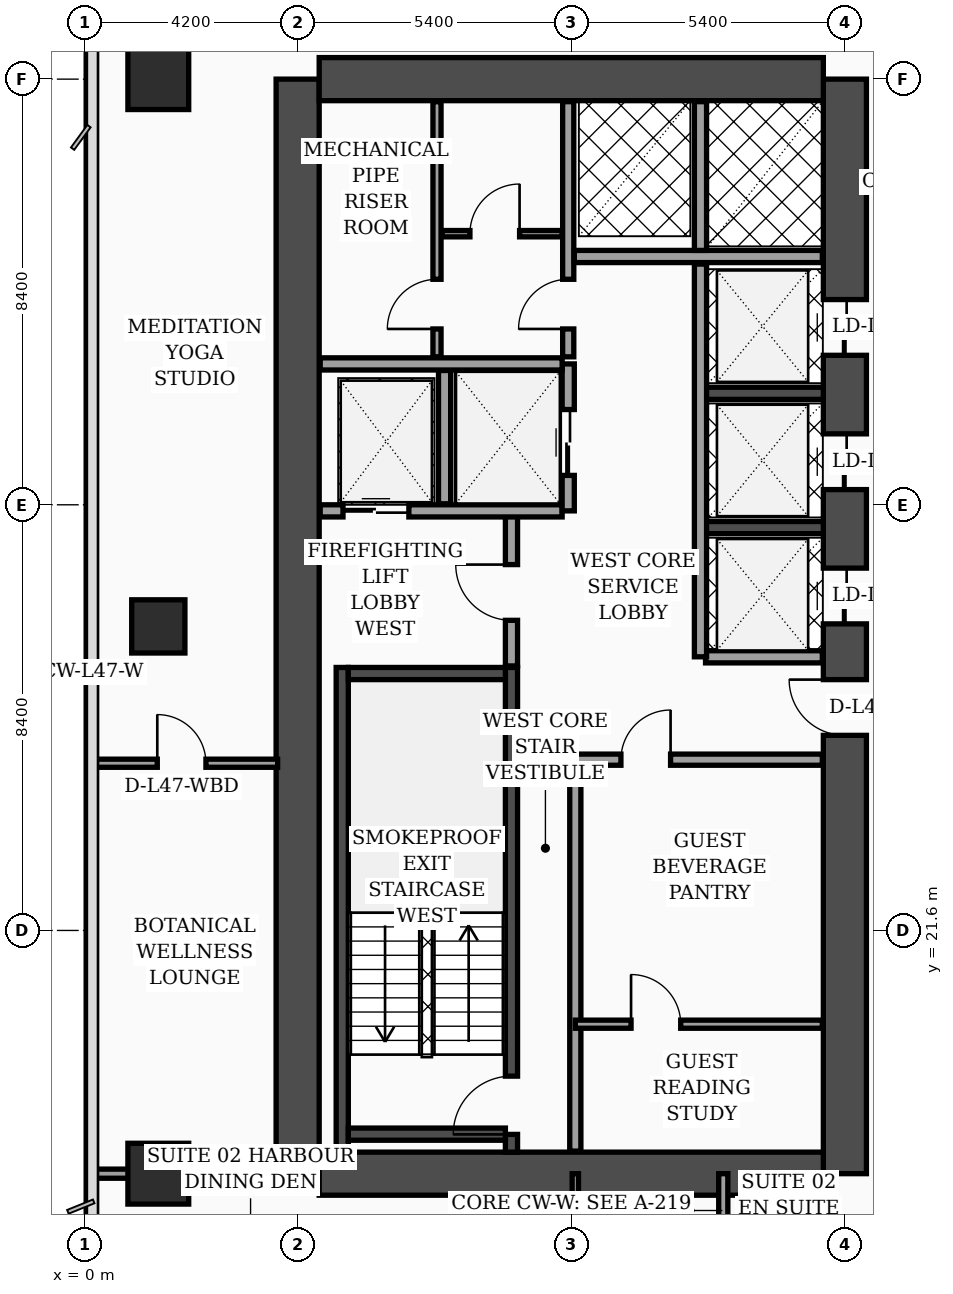
"""IFC4 building model, lengths in metres.
Left out: names, types, materials, properties, quantities, classifications, styles, units other than length and angle.
Written with IfcOpenShell. Run it as: python <this file> out.ifc"""

import sys

from ifc_helpers import new_model, si_unit, direction, frame, frame_2d, origin, origin_2d, place, context, subcontext, project, spatial, rectangle, extrude, element, fill, save


model = new_model("IFC4")
c1 = context("Model", 3, precision=1e-05, world=origin(), true_north=direction((0.0, 1.0)))
c2 = subcontext(c1, "Body", "Model", "MODEL_VIEW")
j1 = project(units=[si_unit("LENGTHUNIT", "METRE"), si_unit("PLANEANGLEUNIT", "RADIAN")], contexts=[c1])
p1 = place(None, origin())
s1 = spatial("IfcSite", under=j1, at=p1, CompositionType="ELEMENT")
p2 = place(p1, origin())
s2 = spatial("IfcBuilding", under=s1, at=p2, CompositionType="ELEMENT")
p3 = place(p2, frame((0.0, 0.0, 191.3)))
s3 = spatial("IfcBuildingStorey", under=s2, at=p3, CompositionType="ELEMENT", Elevation=191.3)
p4 = place(p3, frame((4.2, 16.8, 0.0), z_axis=(0.0, 0.0, 1.0), x_axis=(0.0, 1.0, 0.0)))
e1 = element("IfcWall", 1, at=p4, inside=s3, PredefinedType="SHEAR", context=c2, shape_type="SweptSolid", body=[
    extrude(rectangle(XDim=21.6, YDim=0.85, at=frame_2d((10.8, 0.0))), origin(), (0.0, 0.0, 1.0), 3.56),
])
p5 = place(p3, frame((15.0, 16.8, 0.0), z_axis=(0.0, 0.0, 1.0), x_axis=(0.0, 1.0, 0.0)))
e2 = element("IfcWall", 2, at=p5, inside=s3, PredefinedType="SHEAR", context=c2, shape_type="SweptSolid", body=[
    extrude(rectangle(XDim=21.6, YDim=0.85, at=frame_2d((10.8, 0.0))), origin(), (0.0, 0.0, 1.0), 3.56),
])
p6 = place(p5, frame((8.65, 0.0, 0.0)))
e3 = element("IfcOpeningElement", 3, at=p6, cuts=e2, PredefinedType="OPENING", context=c2, shape_type="SweptSolid", body=[
    extrude(rectangle(XDim=1.1, YDim=2.2, at=frame_2d((0.55, 1.1))), frame((0.0, 0.435, 0.0), z_axis=(0.0, -1.0, 0.0), x_axis=(1.0, 0.0, 0.0)), (0.0, 0.0, 1.0), 0.87),
])
p7 = place(p5, frame((10.85, 0.0, 0.0)))
e4 = element("IfcOpeningElement", 4, at=p7, cuts=e2, PredefinedType="OPENING", context=c2, shape_type="SweptSolid", body=[
    extrude(rectangle(XDim=1.1, YDim=2.2, at=frame_2d((0.55, 1.1))), frame((0.0, 0.435, 0.0), z_axis=(0.0, -1.0, 0.0), x_axis=(1.0, 0.0, 0.0)), (0.0, 0.0, 1.0), 0.87),
])
p8 = place(p5, frame((13.5, 0.0, 0.0)))
e5 = element("IfcOpeningElement", 5, at=p8, cuts=e2, PredefinedType="OPENING", context=c2, shape_type="SweptSolid", body=[
    extrude(rectangle(XDim=1.1, YDim=2.2, at=frame_2d((0.55, 1.1))), frame((0.0, 0.435, 0.0), z_axis=(0.0, -1.0, 0.0), x_axis=(1.0, 0.0, 0.0)), (0.0, 0.0, 1.0), 0.87),
])
p9 = place(p5, frame((16.15, 0.0, 0.0)))
e6 = element("IfcOpeningElement", 6, at=p9, cuts=e2, PredefinedType="OPENING", context=c2, shape_type="SweptSolid", body=[
    extrude(rectangle(XDim=1.1, YDim=2.2, at=frame_2d((0.55, 1.1))), frame((0.0, 0.435, 0.0), z_axis=(0.0, -1.0, 0.0), x_axis=(1.0, 0.0, 0.0)), (0.0, 0.0, 1.0), 0.87),
])
for number, where, z_axis, x_axis in (
    (7, (4.625, 38.4, 0.0), (0.0, 0.0, 1.0), (1.0, 0.0, 0.0)),
    (8, (4.625, 16.8, 0.0), (0.0, 0.0, 1.0), (1.0, 0.0, 0.0)),
):
    element("IfcWall", number, at=place(p3, frame(where, z_axis=z_axis, x_axis=x_axis)), inside=s3, PredefinedType="SHEAR", context=c2, shape_type="SweptSolid", body=[
        extrude(rectangle(XDim=9.95, YDim=0.85, at=frame_2d((4.975, 0.0))), origin(), (0.0, 0.0, 1.0), 3.56),
    ])
p10 = place(p3, frame((5.08, 17.225, 0.0), z_axis=(0.0, 0.0, 1.0), x_axis=(0.0, 1.0, 0.0)))
e9 = element("IfcWall", 9, at=p10, inside=s3, PredefinedType="SOLIDWALL", context=c2, shape_type="SweptSolid", body=[
    extrude(rectangle(XDim=9.565, YDim=0.24, at=frame_2d((4.782, 0.0))), origin(), (0.0, 0.0, 1.0), 3.56),
])
p11 = place(p3, frame((8.42, 17.225, 0.0), z_axis=(0.0, 0.0, 1.0), x_axis=(0.0, 1.0, 0.0)))
e10 = element("IfcWall", 10, at=p11, inside=s3, PredefinedType="SOLIDWALL", context=c2, shape_type="SweptSolid", body=[
    extrude(rectangle(XDim=9.565, YDim=0.24, at=frame_2d((4.782, 0.0))), origin(), (0.0, 0.0, 1.0), 3.56),
])
p12 = place(p11, frame((0.35, 0.0, 0.0)))
e11 = element("IfcOpeningElement", 11, at=p12, cuts=e10, PredefinedType="OPENING", context=c2, shape_type="SweptSolid", body=[
    extrude(rectangle(XDim=1.15, YDim=2.2, at=frame_2d((0.575, 1.1))), frame((0.0, 0.13, 0.0), z_axis=(0.0, -1.0, 0.0), x_axis=(1.0, 0.0, 0.0)), (0.0, 0.0, 1.0), 0.26),
])
for number, where, z_axis, x_axis in (
    (12, (5.2, 17.58, 0.0), (0.0, 0.0, 1.0), (1.0, 0.0, 0.0)),
    (13, (5.2, 26.67, 0.0), (0.0, 0.0, 1.0), (1.0, 0.0, 0.0)),
):
    element("IfcWall", number, at=place(p3, frame(where, z_axis=z_axis, x_axis=x_axis)), inside=s3, PredefinedType="SOLIDWALL", context=c2, shape_type="SweptSolid", body=[
        extrude(rectangle(XDim=3.1, YDim=0.24, at=frame_2d((1.55, 0.0))), origin(), (0.0, 0.0, 1.0), 3.56),
    ])
for number, where, z_axis, x_axis in (
    (14, (12.18, 29.55, 0.0), (0.0, 0.0, 1.0), (1.0, 0.0, 0.0)),
    (15, (12.18, 32.2, 0.0), (0.0, 0.0, 1.0), (1.0, 0.0, 0.0)),
):
    element("IfcWall", number, at=place(p3, frame(where, z_axis=z_axis, x_axis=x_axis)), inside=s3, PredefinedType="SOLIDWALL", context=c2, shape_type="SweptSolid", body=[
        extrude(rectangle(XDim=2.395, YDim=0.24, at=frame_2d((1.198, 0.0))), origin(), (0.0, 0.0, 1.0), 3.56),
    ])
p13 = place(p3, frame((1.45, 16.8, 0.0), z_axis=(0.0, 0.0, 1.0), x_axis=(1.0, 0.0, 0.0)))
e16 = element("IfcColumn", 16, at=p13, inside=s3, PredefinedType="COLUMN", context=c2, shape_type="SweptSolid", body=[
    extrude(rectangle(XDim=1.2, YDim=1.2, at=origin_2d()), origin(), (0.0, 0.0, 1.0), 3.56),
])
p14 = place(p3, frame((1.45, 27.6, 0.0), z_axis=(0.0, 0.0, 1.0), x_axis=(1.0, 0.0, 0.0)))
e17 = element("IfcColumn", 17, at=p14, inside=s3, PredefinedType="COLUMN", context=c2, shape_type="SweptSolid", body=[
    extrude(rectangle(XDim=1.05, YDim=1.05, at=origin_2d()), origin(), (0.0, 0.0, 1.0), 3.56),
])
p15 = place(p3, frame((1.45, 38.4, 0.0), z_axis=(0.0, 0.0, 1.0), x_axis=(1.0, 0.0, 0.0)))
e18 = element("IfcColumn", 18, at=p15, inside=s3, PredefinedType="COLUMN", context=c2, shape_type="SweptSolid", body=[
    extrude(rectangle(XDim=1.2, YDim=1.2, at=origin_2d()), origin(), (0.0, 0.0, 1.0), 3.56),
])
p16 = place(p3, frame((8.42, 26.82, 0.0), z_axis=(0.0, 0.0, 1.0), x_axis=(0.0, 1.0, 0.0)))
e19 = element("IfcWall", 19, at=p16, inside=s3, PredefinedType="SOLIDWALL", context=c2, shape_type="SweptSolid", body=[
    extrude(rectangle(XDim=3.0, YDim=0.24, at=frame_2d((1.5, 0.0))), origin(), (0.0, 0.0, 1.0), 3.56),
])
p17 = place(p16, frame((0.9, 0.0, 0.0)))
e20 = element("IfcOpeningElement", 20, at=p17, cuts=e19, PredefinedType="OPENING", context=c2, shape_type="SweptSolid", body=[
    extrude(rectangle(XDim=1.1, YDim=2.2, at=frame_2d((0.55, 1.1))), frame((0.0, 0.13, 0.0), z_axis=(0.0, -1.0, 0.0), x_axis=(1.0, 0.0, 0.0)), (0.0, 0.0, 1.0), 0.26),
])
p18 = place(p3, frame((4.645, 29.88, 0.0), z_axis=(0.0, 0.0, 1.0), x_axis=(1.0, 0.0, 0.0)))
e21 = element("IfcWall", 21, at=p18, inside=s3, PredefinedType="SOLIDWALL", context=c2, shape_type="SweptSolid", body=[
    extrude(rectangle(XDim=4.775, YDim=0.24, at=frame_2d((2.387, 0.0))), origin(), (0.0, 0.0, 1.0), 3.56),
])
p19 = place(p18, frame((0.45, 0.0, 0.0)))
e22 = element("IfcOpeningElement", 22, at=p19, cuts=e21, PredefinedType="OPENING", context=c2, shape_type="SweptSolid", body=[
    extrude(rectangle(XDim=1.3, YDim=2.35, at=frame_2d((0.65, 1.175))), frame((0.0, 0.13, 0.0), z_axis=(0.0, -1.0, 0.0), x_axis=(1.0, 0.0, 0.0)), (0.0, 0.0, 1.0), 0.26),
])
p20 = place(p3, frame((7.1, 30.02, 0.0), z_axis=(0.0, 0.0, 1.0), x_axis=(0.0, 1.0, 0.0)))
e23 = element("IfcWall", 23, at=p20, inside=s3, PredefinedType="SOLIDWALL", context=c2, shape_type="SweptSolid", body=[
    extrude(rectangle(XDim=2.63, YDim=0.24, at=frame_2d((1.315, 0.0))), origin(), (0.0, 0.0, 1.0), 3.56),
])
p21 = place(p3, frame((9.54, 29.88, 0.0), z_axis=(0.0, 0.0, 1.0), x_axis=(0.0, 1.0, 0.0)))
e24 = element("IfcWall", 24, at=p21, inside=s3, PredefinedType="SOLIDWALL", context=c2, shape_type="SweptSolid", body=[
    extrude(rectangle(XDim=2.9, YDim=0.24, at=frame_2d((1.45, 0.0))), origin(), (0.0, 0.0, 1.0), 3.56),
])
p22 = place(p21, frame((0.7, 0.0, 0.0)))
e25 = element("IfcOpeningElement", 25, at=p22, cuts=e24, PredefinedType="OPENING", context=c2, shape_type="SweptSolid", body=[
    extrude(rectangle(XDim=1.3, YDim=2.35, at=frame_2d((0.65, 1.175))), frame((0.0, 0.13, 0.0), z_axis=(0.0, -1.0, 0.0), x_axis=(1.0, 0.0, 0.0)), (0.0, 0.0, 1.0), 0.26),
])
p23 = place(p3, frame((4.645, 32.78, 0.0), z_axis=(0.0, 0.0, 1.0), x_axis=(1.0, 0.0, 0.0)))
e26 = element("IfcWall", 26, at=p23, inside=s3, PredefinedType="SOLIDWALL", context=c2, shape_type="SweptSolid", body=[
    extrude(rectangle(XDim=4.775, YDim=0.24, at=frame_2d((2.387, 0.0))), origin(), (0.0, 0.0, 1.0), 3.19),
])
p24 = place(p3, frame((9.68, 17.245, 0.0), z_axis=(0.0, 0.0, 1.0), x_axis=(0.0, 1.0, 0.0)))
e27 = element("IfcWall", 27, at=p24, inside=s3, PredefinedType="SOLIDWALL", context=c2, shape_type="SweptSolid", body=[
    extrude(rectangle(XDim=7.755, YDim=0.22, at=frame_2d((3.877, 0.0))), origin(), (0.0, 0.0, 1.0), 3.56),
])
p25 = place(p3, frame((6.95, 32.92, 0.0), z_axis=(0.0, 0.0, 1.0), x_axis=(0.0, 1.0, 0.0)))
e28 = element("IfcWall", 28, at=p25, inside=s3, PredefinedType="PARTITIONING", context=c2, shape_type="SweptSolid", body=[
    extrude(rectangle(XDim=5.035, YDim=0.16, at=frame_2d((2.518, 0.0))), origin(), (0.0, 0.0, 1.0), 3.56),
])
p26 = place(p25, frame((0.55, 0.0, 0.0)))
e29 = element("IfcOpeningElement", 29, at=p26, cuts=e28, PredefinedType="OPENING", context=c2, shape_type="SweptSolid", body=[
    extrude(rectangle(XDim=0.98, YDim=2.15, at=frame_2d((0.49, 1.075))), frame((0.0, 0.09, 0.0), z_axis=(0.0, -1.0, 0.0), x_axis=(1.0, 0.0, 0.0)), (0.0, 0.0, 1.0), 0.18),
])
p27 = place(p3, frame((7.05, 35.35, 0.0), z_axis=(0.0, 0.0, 1.0), x_axis=(1.0, 0.0, 0.0)))
e30 = element("IfcWall", 30, at=p27, inside=s3, PredefinedType="PARTITIONING", context=c2, shape_type="SweptSolid", body=[
    extrude(rectangle(XDim=2.37, YDim=0.125, at=frame_2d((1.185, 0.0))), origin(), (0.0, 0.0, 1.0), 3.56),
])
p28 = place(p27, frame((0.55, 0.0, 0.0)))
e31 = element("IfcOpeningElement", 31, at=p28, cuts=e30, PredefinedType="OPENING", context=c2, shape_type="SweptSolid", body=[
    extrude(rectangle(XDim=0.98, YDim=2.15, at=frame_2d((0.49, 1.075))), frame((0.0, 0.073, 0.0), z_axis=(0.0, -1.0, 0.0), x_axis=(1.0, 0.0, 0.0)), (0.0, 0.0, 1.0), 0.145),
])
p29 = place(p3, frame((9.54, 32.92, 0.0), z_axis=(0.0, 0.0, 1.0), x_axis=(0.0, 1.0, 0.0)))
e32 = element("IfcWall", 32, at=p29, inside=s3, PredefinedType="SOLIDWALL", context=c2, shape_type="SweptSolid", body=[
    extrude(rectangle(XDim=5.035, YDim=0.22, at=frame_2d((2.518, 0.0))), origin(), (0.0, 0.0, 1.0), 3.56),
])
p30 = place(p29, frame((0.55, 0.0, 0.0)))
e33 = element("IfcOpeningElement", 33, at=p30, cuts=e32, PredefinedType="OPENING", context=c2, shape_type="SweptSolid", body=[
    extrude(rectangle(XDim=0.98, YDim=2.15, at=frame_2d((0.49, 1.075))), frame((0.0, 0.12, 0.0), z_axis=(0.0, -1.0, 0.0), x_axis=(1.0, 0.0, 0.0)), (0.0, 0.0, 1.0), 0.24),
])
p31 = place(p3, frame((9.68, 19.75, 0.0), z_axis=(0.0, 0.0, 1.0), x_axis=(1.0, 0.0, 0.0)))
e34 = element("IfcWall", 34, at=p31, inside=s3, PredefinedType="PARTITIONING", context=c2, shape_type="SweptSolid", body=[
    extrude(rectangle(XDim=4.875, YDim=0.16, at=frame_2d((2.438, 0.0))), origin(), (0.0, 0.0, 1.0), 3.56),
])
p32 = place(p31, frame((1.1, 0.0, 0.0)))
e35 = element("IfcOpeningElement", 35, at=p32, cuts=e34, PredefinedType="OPENING", context=c2, shape_type="SweptSolid", body=[
    extrude(rectangle(XDim=0.98, YDim=2.15, at=frame_2d((0.49, 1.075))), frame((0.0, 0.09, 0.0), z_axis=(0.0, -1.0, 0.0), x_axis=(1.0, 0.0, 0.0)), (0.0, 0.0, 1.0), 0.18),
])
p33 = place(p3, frame((9.68, 24.97, 0.0), z_axis=(0.0, 0.0, 1.0), x_axis=(1.0, 0.0, 0.0)))
e36 = element("IfcWall", 36, at=p33, inside=s3, PredefinedType="SOLIDWALL", context=c2, shape_type="SweptSolid", body=[
    extrude(rectangle(XDim=4.875, YDim=0.22, at=frame_2d((2.438, 0.0))), origin(), (0.0, 0.0, 1.0), 2.94),
])
p34 = place(p33, frame((0.9, 0.0, 0.0)))
e37 = element("IfcOpeningElement", 37, at=p34, cuts=e36, PredefinedType="OPENING", context=c2, shape_type="SweptSolid", body=[
    extrude(rectangle(XDim=0.98, YDim=2.15, at=frame_2d((0.49, 1.075))), frame((0.0, 0.12, 0.0), z_axis=(0.0, -1.0, 0.0), x_axis=(1.0, 0.0, 0.0)), (0.0, 0.0, 1.0), 0.24),
])
p35 = place(p3, frame((12.25, 27.0, 0.0), z_axis=(0.0, 0.0, 1.0), x_axis=(1.0, 0.0, 0.0)))
e38 = element("IfcWall", 38, at=p35, inside=s3, PredefinedType="SOLIDWALL", context=c2, shape_type="SweptSolid", body=[
    extrude(rectangle(XDim=2.305, YDim=0.24, at=frame_2d((1.152, 0.0))), origin(), (0.0, 0.0, 1.0), 3.56),
])
p36 = place(p3, frame((12.15, 27.0, 0.0), z_axis=(0.0, 0.0, 1.0), x_axis=(0.0, 1.0, 0.0)))
e39 = element("IfcWall", 39, at=p36, inside=s3, PredefinedType="SOLIDWALL", context=c2, shape_type="SweptSolid", body=[
    extrude(rectangle(XDim=7.75, YDim=0.24, at=frame_2d((3.875, 0.0))), origin(), (0.0, 0.0, 1.0), 3.56),
])
p37 = place(p3, frame((9.66, 34.9, 0.0), z_axis=(0.0, 0.0, 1.0), x_axis=(1.0, 0.0, 0.0)))
e40 = element("IfcWall", 40, at=p37, inside=s3, PredefinedType="SOLIDWALL", context=c2, shape_type="SweptSolid", body=[
    extrude(rectangle(XDim=4.895, YDim=0.24, at=frame_2d((2.448, 0.0))), origin(), (0.0, 0.0, 1.0), 3.56),
])
p38 = place(p3, frame((12.15, 35.02, 0.0), z_axis=(0.0, 0.0, 1.0), x_axis=(0.0, 1.0, 0.0)))
e41 = element("IfcWall", 41, at=p38, inside=s3, PredefinedType="SOLIDWALL", context=c2, shape_type="SweptSolid", body=[
    extrude(rectangle(XDim=2.935, YDim=0.24, at=frame_2d((1.468, 0.0))), origin(), (0.0, 0.0, 1.0), 3.56),
])
p39 = place(p3, frame((0.08, 24.9, 0.0), z_axis=(0.0, 0.0, 1.0), x_axis=(1.0, 0.0, 0.0)))
e42 = element("IfcWall", 42, at=p39, inside=s3, PredefinedType="PARTITIONING", context=c2, shape_type="SweptSolid", body=[
    extrude(rectangle(XDim=3.725, YDim=0.16, at=frame_2d((1.862, 0.0))), origin(), (0.0, 0.0, 1.0), 3.09),
])
p40 = place(p39, frame((1.35, 0.0, 0.0)))
e43 = element("IfcOpeningElement", 43, at=p40, cuts=e42, PredefinedType="OPENING", context=c2, shape_type="SweptSolid", body=[
    extrude(rectangle(XDim=0.96, YDim=2.2, at=frame_2d((0.48, 1.1))), frame((0.0, 0.09, 0.0), z_axis=(0.0, -1.0, 0.0), x_axis=(1.0, 0.0, 0.0)), (0.0, 0.0, 1.0), 0.18),
])
p41 = place(p3, frame((0.08, 16.8, 0.0), z_axis=(0.0, 0.0, 1.0), x_axis=(1.0, 0.0, 0.0)))
e44 = element("IfcWall", 44, at=p41, inside=s3, PredefinedType="PARTITIONING", context=c2, shape_type="SweptSolid", body=[
    extrude(rectangle(XDim=3.725, YDim=0.18, at=frame_2d((1.862, 0.0))), origin(), (0.0, 0.0, 1.0), 2.94),
])
p42 = place(p3, frame((9.68, 14.71, 0.0), z_axis=(0.0, 0.0, 1.0), x_axis=(0.0, 1.0, 0.0)))
e45 = element("IfcWall", 45, at=p42, inside=s3, PredefinedType="PARTITIONING", context=c2, shape_type="SweptSolid", body=[
    extrude(rectangle(XDim=2.09, YDim=0.125, at=frame_2d((1.045, 0.0))), origin(), (0.0, 0.0, 1.0), 3.56),
])
p43 = place(p3, frame((12.6, 2.44, 0.0), z_axis=(0.0, 0.0, 1.0), x_axis=(0.0, 1.0, 0.0)))
e46 = element("IfcWall", 46, at=p43, inside=s3, PredefinedType="PARTITIONING", context=c2, shape_type="SweptSolid", body=[
    extrude(rectangle(XDim=14.36, YDim=0.18, at=frame_2d((7.18, 0.0))), origin(), (0.0, 0.0, 1.0), 2.94),
])
p44 = place(p43, frame((3.01, 0.0, 0.0)))
e47 = element("IfcOpeningElement", 47, at=p44, cuts=e46, PredefinedType="OPENING", context=c2, shape_type="SweptSolid", body=[
    extrude(rectangle(XDim=1.02, YDim=2.2, at=frame_2d((0.51, 1.1))), frame((0.0, 0.1, 0.0), z_axis=(0.0, -1.0, 0.0), x_axis=(1.0, 0.0, 0.0)), (0.0, 0.0, 1.0), 0.2),
])
p45 = place(p43, frame((9.03, 0.0, 0.0)))
e48 = element("IfcOpeningElement", 48, at=p45, cuts=e46, PredefinedType="OPENING", context=c2, shape_type="SweptSolid", body=[
    extrude(rectangle(XDim=1.02, YDim=2.2, at=frame_2d((0.51, 1.1))), frame((0.0, 0.1, 0.0), z_axis=(0.0, -1.0, 0.0), x_axis=(1.0, 0.0, 0.0)), (0.0, 0.0, 1.0), 0.2),
])
p46 = place(p17, origin())
e49 = element("IfcDoor", 49, at=p46, inside=s3, OperationType="SINGLE_SWING_RIGHT", PredefinedType="DOOR", context=c2, shape_type="SweptSolid", body=[
    extrude(rectangle(XDim=1.1, YDim=2.2, at=frame_2d((0.55, 1.1))), frame((0.0, 0.025, 0.0), z_axis=(0.0, -1.0, 0.0), x_axis=(1.0, 0.0, 0.0)), (0.0, 0.0, 1.0), 0.05),
])
fill(e20, e49)
p47 = place(p19, origin())
e50 = element("IfcDoor", 50, at=p47, inside=s3, OperationType="DOUBLE_DOOR_SLIDING", PredefinedType="DOOR", context=c2, shape_type="SweptSolid", body=[
    extrude(rectangle(XDim=1.3, YDim=2.35, at=frame_2d((0.65, 1.175))), frame((0.0, 0.025, 0.0), z_axis=(0.0, -1.0, 0.0), x_axis=(1.0, 0.0, 0.0)), (0.0, 0.0, 1.0), 0.05),
])
fill(e22, e50)
p48 = place(p22, origin())
e51 = element("IfcDoor", 51, at=p48, inside=s3, OperationType="DOUBLE_DOOR_SLIDING", PredefinedType="DOOR", context=c2, shape_type="SweptSolid", body=[
    extrude(rectangle(XDim=1.3, YDim=2.35, at=frame_2d((0.65, 1.175))), frame((0.0, 0.025, 0.0), z_axis=(0.0, -1.0, 0.0), x_axis=(1.0, 0.0, 0.0)), (0.0, 0.0, 1.0), 0.05),
])
fill(e25, e51)
p49 = place(p26, origin())
e52 = element("IfcDoor", 52, at=p49, inside=s3, OperationType="SINGLE_SWING_LEFT", PredefinedType="DOOR", context=c2, shape_type="SweptSolid", body=[
    extrude(rectangle(XDim=0.98, YDim=2.15, at=frame_2d((0.49, 1.075))), frame((0.0, 0.025, 0.0), z_axis=(0.0, -1.0, 0.0), x_axis=(1.0, 0.0, 0.0)), (0.0, 0.0, 1.0), 0.05),
])
fill(e29, e52)
p50 = place(p28, origin())
e53 = element("IfcDoor", 53, at=p50, inside=s3, OperationType="SINGLE_SWING_RIGHT", PredefinedType="DOOR", context=c2, shape_type="SweptSolid", body=[
    extrude(rectangle(XDim=0.98, YDim=2.15, at=frame_2d((0.49, 1.075))), frame((0.0, 0.025, 0.0), z_axis=(0.0, -1.0, 0.0), x_axis=(1.0, 0.0, 0.0)), (0.0, 0.0, 1.0), 0.05),
])
fill(e31, e53)
p51 = place(p30, origin())
e54 = element("IfcDoor", 54, at=p51, inside=s3, OperationType="SINGLE_SWING_LEFT", PredefinedType="DOOR", context=c2, shape_type="SweptSolid", body=[
    extrude(rectangle(XDim=0.98, YDim=2.15, at=frame_2d((0.49, 1.075))), frame((0.0, 0.025, 0.0), z_axis=(0.0, -1.0, 0.0), x_axis=(1.0, 0.0, 0.0)), (0.0, 0.0, 1.0), 0.05),
])
fill(e33, e54)
p52 = place(p32, origin())
e55 = element("IfcDoor", 55, at=p52, inside=s3, OperationType="SINGLE_SWING_LEFT", PredefinedType="DOOR", context=c2, shape_type="SweptSolid", body=[
    extrude(rectangle(XDim=0.98, YDim=2.15, at=frame_2d((0.49, 1.075))), frame((0.0, 0.025, 0.0), z_axis=(0.0, -1.0, 0.0), x_axis=(1.0, 0.0, 0.0)), (0.0, 0.0, 1.0), 0.05),
])
fill(e35, e55)
p53 = place(p34, origin())
e56 = element("IfcDoor", 56, at=p53, inside=s3, OperationType="SINGLE_SWING_RIGHT", PredefinedType="DOOR", context=c2, shape_type="SweptSolid", body=[
    extrude(rectangle(XDim=0.98, YDim=2.15, at=frame_2d((0.49, 1.075))), frame((0.0, 0.025, 0.0), z_axis=(0.0, -1.0, 0.0), x_axis=(1.0, 0.0, 0.0)), (0.0, 0.0, 1.0), 0.05),
])
fill(e37, e56)
p54 = place(p40, origin())
e57 = element("IfcDoor", 57, at=p54, inside=s3, OperationType="SINGLE_SWING_LEFT", PredefinedType="DOOR", context=c2, shape_type="SweptSolid", body=[
    extrude(rectangle(XDim=0.96, YDim=2.2, at=frame_2d((0.48, 1.1))), frame((0.0, 0.025, 0.0), z_axis=(0.0, -1.0, 0.0), x_axis=(1.0, 0.0, 0.0)), (0.0, 0.0, 1.0), 0.05),
])
fill(e43, e57)
p55 = place(p12, origin())
e58 = element("IfcDoor", 58, at=p55, inside=s3, OperationType="SINGLE_SWING_LEFT", PredefinedType="DOOR", context=c2, shape_type="SweptSolid", body=[
    extrude(rectangle(XDim=1.15, YDim=2.2, at=frame_2d((0.575, 1.1))), frame((0.0, 0.025, 0.0), z_axis=(0.0, -1.0, 0.0), x_axis=(1.0, 0.0, 0.0)), (0.0, 0.0, 1.0), 0.05),
])
fill(e11, e58)
p56 = place(p6, origin())
e59 = element("IfcDoor", 59, at=p56, inside=s3, OperationType="SINGLE_SWING_RIGHT", PredefinedType="DOOR", context=c2, shape_type="SweptSolid", body=[
    extrude(rectangle(XDim=1.1, YDim=2.2, at=frame_2d((0.55, 1.1))), frame((0.0, 0.025, 0.0), z_axis=(0.0, -1.0, 0.0), x_axis=(1.0, 0.0, 0.0)), (0.0, 0.0, 1.0), 0.05),
])
fill(e3, e59)
p57 = place(p7, origin())
e60 = element("IfcDoor", 60, at=p57, inside=s3, OperationType="DOUBLE_DOOR_SLIDING", PredefinedType="DOOR", context=c2, shape_type="SweptSolid", body=[
    extrude(rectangle(XDim=1.1, YDim=2.2, at=frame_2d((0.55, 1.1))), frame((0.0, 0.025, 0.0), z_axis=(0.0, -1.0, 0.0), x_axis=(1.0, 0.0, 0.0)), (0.0, 0.0, 1.0), 0.05),
])
fill(e4, e60)
p58 = place(p8, origin())
e61 = element("IfcDoor", 61, at=p58, inside=s3, OperationType="DOUBLE_DOOR_SLIDING", PredefinedType="DOOR", context=c2, shape_type="SweptSolid", body=[
    extrude(rectangle(XDim=1.1, YDim=2.2, at=frame_2d((0.55, 1.1))), frame((0.0, 0.025, 0.0), z_axis=(0.0, -1.0, 0.0), x_axis=(1.0, 0.0, 0.0)), (0.0, 0.0, 1.0), 0.05),
])
fill(e5, e61)
p59 = place(p9, origin())
e62 = element("IfcDoor", 62, at=p59, inside=s3, OperationType="DOUBLE_DOOR_SLIDING", PredefinedType="DOOR", context=c2, shape_type="SweptSolid", body=[
    extrude(rectangle(XDim=1.1, YDim=2.2, at=frame_2d((0.55, 1.1))), frame((0.0, 0.025, 0.0), z_axis=(0.0, -1.0, 0.0), x_axis=(1.0, 0.0, 0.0)), (0.0, 0.0, 1.0), 0.05),
])
fill(e6, e62)
save(model, sys.argv[1])
